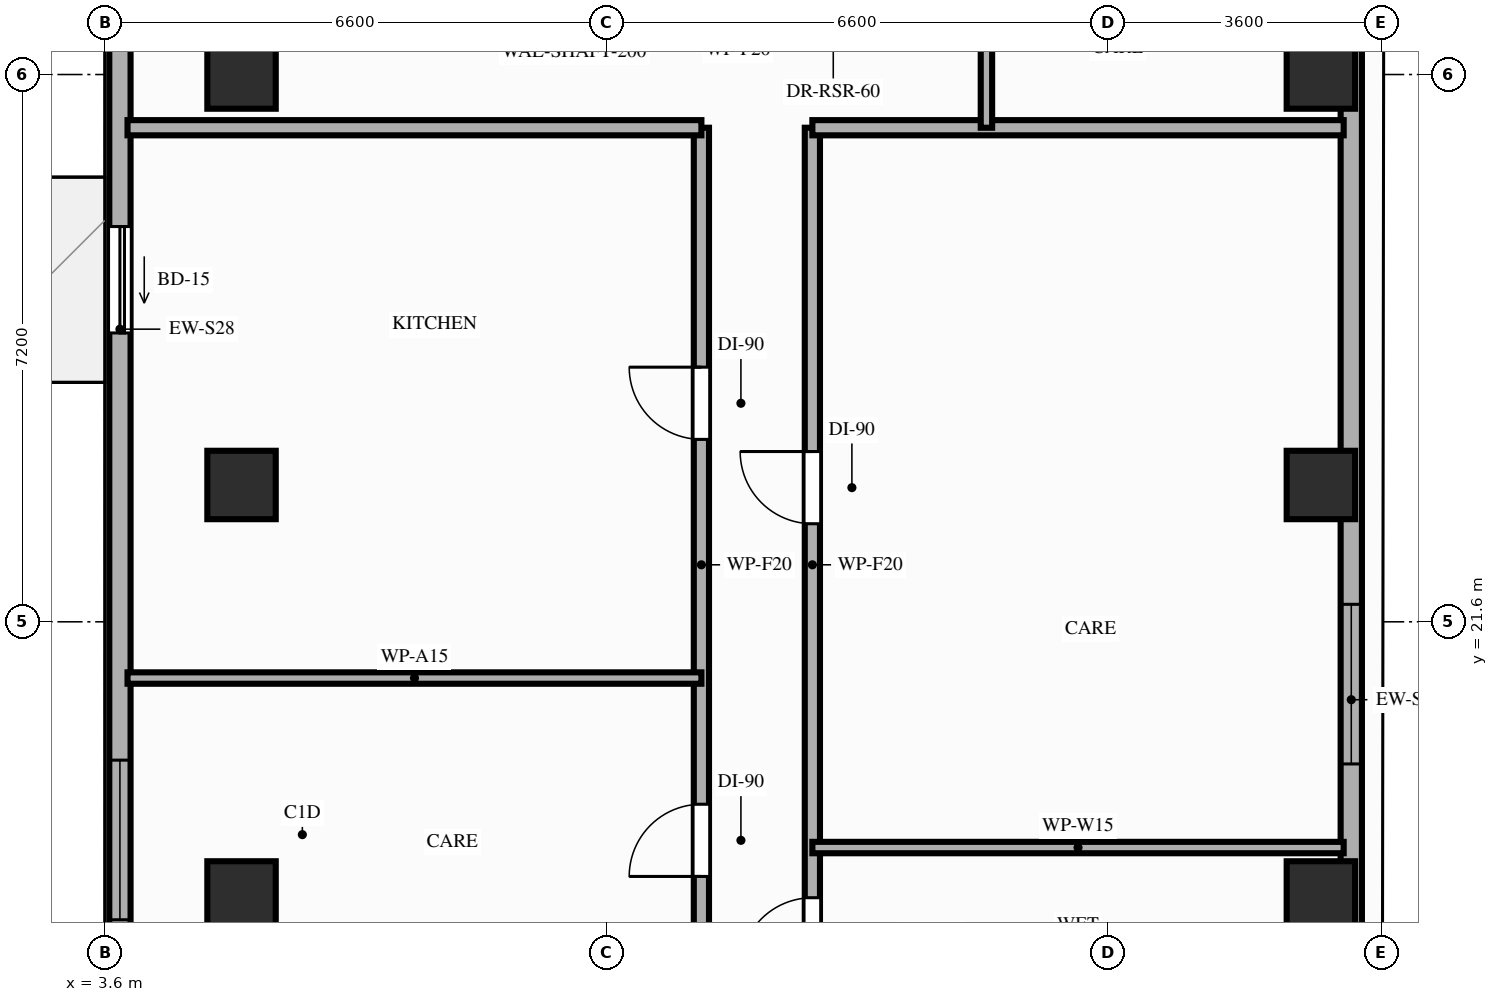
"""IFC4 building model, lengths in metres.
Left out: names, types, materials, properties, quantities, classifications, styles, units other than length and angle.
Written with IfcOpenShell. Run it as: python <this file> out.ifc"""

import sys

from ifc_helpers import new_model, si_unit, direction, frame, frame_2d, origin, origin_2d, place, context, subcontext, project, spatial, rectangle, extrude, element, fill, save


model = new_model("IFC4")
c1 = context("Model", 3, precision=1e-05, world=origin(), true_north=direction((0.0, 1.0)))
c2 = subcontext(c1, "Body", "Model", "MODEL_VIEW")
j1 = project(units=[si_unit("LENGTHUNIT", "METRE"), si_unit("PLANEANGLEUNIT", "RADIAN")], contexts=[c1])
p1 = place(None, origin())
s1 = spatial("IfcSite", under=j1, at=p1, CompositionType="ELEMENT")
p2 = place(p1, origin())
s2 = spatial("IfcBuilding", under=s1, at=p2, CompositionType="ELEMENT")
p3 = place(p2, frame((0.0, 0.0, 211.2)))
s3 = spatial("IfcBuildingStorey", under=s2, at=p3, CompositionType="ELEMENT", Elevation=211.2)
for number, where, z_axis, x_axis in (
    (1, (5.4, 18.0, 0.0), (0.0, 0.0, 1.0), (1.0, 0.0, 0.0)),
    (2, (19.6, 18.0, 0.0), (0.0, 0.0, 1.0), (1.0, 0.0, 0.0)),
    (3, (5.4, 23.4, 0.0), (0.0, 0.0, 1.0), (1.0, 0.0, 0.0)),
    (4, (19.6, 23.4, 0.0), (0.0, 0.0, 1.0), (1.0, 0.0, 0.0)),
    (5, (5.4, 28.8, 0.0), (0.0, 0.0, 1.0), (1.0, 0.0, 0.0)),
    (6, (19.6, 28.8, 0.0), (0.0, 0.0, 1.0), (1.0, 0.0, 0.0)),
):
    element("IfcColumn", number, at=place(p3, frame(where, z_axis=z_axis, x_axis=x_axis)), inside=s3, PredefinedType="COLUMN", context=c2, shape_type="SweptSolid", body=[
        extrude(rectangle(XDim=0.9, YDim=0.9, at=origin_2d()), origin(), (0.0, 0.0, 1.0), 3.2),
    ])
p4 = place(p3, frame((3.8, 42.1, 0.0), z_axis=(0.0, 0.0, 1.0), x_axis=(0.0, -1.0, 0.0)))
e7 = element("IfcWall", 7, at=p4, inside=s3, PredefinedType="STANDARD", context=c2, shape_type="SweptSolid", body=[
    extrude(rectangle(XDim=33.3, YDim=0.28, at=frame_2d((16.65, 0.0))), origin(), (0.0, 0.0, 1.0), 2.96),
])
p5 = place(p4, frame((26.1, 0.0, 0.0)))
e8 = element("IfcOpeningElement", 8, at=p5, cuts=e7, PredefinedType="OPENING", context=c2, shape_type="SweptSolid", body=[
    extrude(rectangle(XDim=1.4, YDim=2.1, at=frame_2d((0.7, 1.05))), frame((0.0, 0.15, 0.0), z_axis=(0.0, -1.0, 0.0), x_axis=(1.0, 0.0, 0.0)), (0.0, 0.0, 1.0), 0.3),
])
p6 = place(p4, frame((15.3, 0.0, 0.0)))
e9 = element("IfcOpeningElement", 9, at=p6, cuts=e7, PredefinedType="OPENING", context=c2, shape_type="SweptSolid", body=[
    extrude(rectangle(XDim=1.4, YDim=2.1, at=frame_2d((0.7, 1.05))), frame((0.0, 0.15, 0.0), z_axis=(0.0, -1.0, 0.0), x_axis=(1.0, 0.0, 0.0)), (0.0, 0.0, 1.0), 0.3),
])
p7 = place(p4, frame((22.32, 0.0, 0.85)))
e10 = element("IfcOpeningElement", 10, at=p7, cuts=e7, PredefinedType="OPENING", context=c2, shape_type="SweptSolid", body=[
    extrude(rectangle(XDim=2.1, YDim=1.8, at=frame_2d((1.05, 0.9))), frame((0.0, 0.15, 0.0), z_axis=(0.0, -1.0, 0.0), x_axis=(1.0, 0.0, 0.0)), (0.0, 0.0, 1.0), 0.3),
])
p8 = place(p4, frame((30.65, 0.0, 0.85)))
e11 = element("IfcOpeningElement", 11, at=p8, cuts=e7, PredefinedType="OPENING", context=c2, shape_type="SweptSolid", body=[
    extrude(rectangle(XDim=2.1, YDim=1.8, at=frame_2d((1.05, 0.9))), frame((0.0, 0.15, 0.0), z_axis=(0.0, -1.0, 0.0), x_axis=(1.0, 0.0, 0.0)), (0.0, 0.0, 1.0), 0.3),
])
p9 = place(p4, frame((9.75, 0.0, 0.85)))
e12 = element("IfcOpeningElement", 12, at=p9, cuts=e7, PredefinedType="OPENING", context=c2, shape_type="SweptSolid", body=[
    extrude(rectangle(XDim=2.1, YDim=1.8, at=frame_2d((1.05, 0.9))), frame((0.0, 0.15, 0.0), z_axis=(0.0, -1.0, 0.0), x_axis=(1.0, 0.0, 0.0)), (0.0, 0.0, 1.0), 0.3),
])
p10 = place(p4, frame((3.65, 0.0, 0.85)))
e13 = element("IfcOpeningElement", 13, at=p10, cuts=e7, PredefinedType="OPENING", context=c2, shape_type="SweptSolid", body=[
    extrude(rectangle(XDim=2.1, YDim=1.8, at=frame_2d((1.05, 0.9))), frame((0.0, 0.15, 0.0), z_axis=(0.0, -1.0, 0.0), x_axis=(1.0, 0.0, 0.0)), (0.0, 0.0, 1.0), 0.3),
])
p11 = place(p3, frame((20.0, 8.8, 0.0), z_axis=(0.0, 0.0, 1.0), x_axis=(0.0, 1.0, 0.0)))
e14 = element("IfcWall", 14, at=p11, inside=s3, PredefinedType="STANDARD", context=c2, shape_type="SweptSolid", body=[
    extrude(rectangle(XDim=23.55, YDim=0.28, at=frame_2d((11.775, 0.0))), origin(), (0.0, 0.0, 1.0), 2.45),
])
p12 = place(p11, frame((20.86, 0.0, 0.85)))
e15 = element("IfcOpeningElement", 15, at=p12, cuts=e14, PredefinedType="OPENING", context=c2, shape_type="SweptSolid", body=[
    extrude(rectangle(XDim=1.1, YDim=1.35, at=frame_2d((0.55, 0.675))), frame((0.0, 0.15, 0.0), z_axis=(0.0, -1.0, 0.0), x_axis=(1.0, 0.0, 0.0)), (0.0, 0.0, 1.0), 0.3),
])
p13 = place(p11, frame((5.12, 0.0, 0.85)))
e16 = element("IfcOpeningElement", 16, at=p13, cuts=e14, PredefinedType="OPENING", context=c2, shape_type="SweptSolid", body=[
    extrude(rectangle(XDim=2.1, YDim=1.35, at=frame_2d((1.05, 0.675))), frame((0.0, 0.15, 0.0), z_axis=(0.0, -1.0, 0.0), x_axis=(1.0, 0.0, 0.0)), (0.0, 0.0, 1.0), 0.3),
])
p14 = place(p11, frame((10.93, 0.0, 0.85)))
e17 = element("IfcOpeningElement", 17, at=p14, cuts=e14, PredefinedType="OPENING", context=c2, shape_type="SweptSolid", body=[
    extrude(rectangle(XDim=2.1, YDim=1.35, at=frame_2d((1.05, 0.675))), frame((0.0, 0.15, 0.0), z_axis=(0.0, -1.0, 0.0), x_axis=(1.0, 0.0, 0.0)), (0.0, 0.0, 1.0), 0.3),
])
p15 = place(p3, frame((11.45, 16.6, 0.0), z_axis=(0.0, 0.0, 1.0), x_axis=(0.0, 1.0, 0.0)))
e18 = element("IfcWall", 18, at=p15, inside=s3, PredefinedType="PARTITIONING", context=c2, shape_type="SweptSolid", body=[
    extrude(rectangle(XDim=11.5, YDim=0.2, at=frame_2d((5.75, 0.0))), origin(), (0.0, 0.0, 1.0), 2.45),
])
p16 = place(p15, frame((1.65, 0.0, 0.0)))
e19 = element("IfcOpeningElement", 19, at=p16, cuts=e18, PredefinedType="OPENING", context=c2, shape_type="SweptSolid", body=[
    extrude(rectangle(XDim=0.95, YDim=2.15, at=frame_2d((0.475, 1.075))), frame((0.0, 0.11, 0.0), z_axis=(0.0, -1.0, 0.0), x_axis=(1.0, 0.0, 0.0)), (0.0, 0.0, 1.0), 0.22),
])
p17 = place(p15, frame((7.4, 0.0, 0.0)))
e20 = element("IfcOpeningElement", 20, at=p17, cuts=e18, PredefinedType="OPENING", context=c2, shape_type="SweptSolid", body=[
    extrude(rectangle(XDim=0.95, YDim=2.15, at=frame_2d((0.475, 1.075))), frame((0.0, 0.11, 0.0), z_axis=(0.0, -1.0, 0.0), x_axis=(1.0, 0.0, 0.0)), (0.0, 0.0, 1.0), 0.22),
])
p18 = place(p3, frame((12.91, 16.6, 0.0), z_axis=(0.0, 0.0, 1.0), x_axis=(0.0, 1.0, 0.0)))
e21 = element("IfcWall", 21, at=p18, inside=s3, PredefinedType="PARTITIONING", context=c2, shape_type="SweptSolid", body=[
    extrude(rectangle(XDim=11.5, YDim=0.2, at=frame_2d((5.75, 0.0))), origin(), (0.0, 0.0, 1.0), 2.45),
])
p19 = place(p18, frame((0.42, 0.0, 0.0)))
e22 = element("IfcOpeningElement", 22, at=p19, cuts=e21, PredefinedType="OPENING", context=c2, shape_type="SweptSolid", body=[
    extrude(rectangle(XDim=0.95, YDim=2.1, at=frame_2d((0.475, 1.05))), frame((0.0, 0.11, 0.0), z_axis=(0.0, -1.0, 0.0), x_axis=(1.0, 0.0, 0.0)), (0.0, 0.0, 1.0), 0.22),
])
p20 = place(p18, frame((6.29, 0.0, 0.0)))
e23 = element("IfcOpeningElement", 23, at=p20, cuts=e21, PredefinedType="OPENING", context=c2, shape_type="SweptSolid", body=[
    extrude(rectangle(XDim=0.95, YDim=2.15, at=frame_2d((0.475, 1.075))), frame((0.0, 0.11, 0.0), z_axis=(0.0, -1.0, 0.0), x_axis=(1.0, 0.0, 0.0)), (0.0, 0.0, 1.0), 0.22),
])
p21 = place(p3, frame((3.9, 28.1, 0.0), z_axis=(0.0, 0.0, 1.0), x_axis=(1.0, 0.0, 0.0)))
e24 = element("IfcWall", 24, at=p21, inside=s3, PredefinedType="PARTITIONING", context=c2, shape_type="SweptSolid", body=[
    extrude(rectangle(XDim=7.55, YDim=0.2, at=frame_2d((3.775, 0.0))), origin(), (0.0, 0.0, 1.0), 2.45),
])
p22 = place(p3, frame((12.91, 28.1, 0.0), z_axis=(0.0, 0.0, 1.0), x_axis=(1.0, 0.0, 0.0)))
e25 = element("IfcWall", 25, at=p22, inside=s3, PredefinedType="PARTITIONING", context=c2, shape_type="SweptSolid", body=[
    extrude(rectangle(XDim=6.99, YDim=0.2, at=frame_2d((3.495, 0.0))), origin(), (0.0, 0.0, 1.0), 2.45),
])
p23 = place(p3, frame((15.2, 28.1, 0.0), z_axis=(0.0, 0.0, 1.0), x_axis=(0.0, 1.0, 0.0)))
e26 = element("IfcWall", 26, at=p23, inside=s3, PredefinedType="PARTITIONING", context=c2, shape_type="SweptSolid", body=[
    extrude(rectangle(XDim=3.05, YDim=0.15, at=frame_2d((1.525, 0.0))), origin(), (0.0, 0.0, 1.0), 2.45),
])
p24 = place(p3, frame((3.9, 20.86, 0.0), z_axis=(0.0, 0.0, 1.0), x_axis=(1.0, 0.0, 0.0)))
e27 = element("IfcWall", 27, at=p24, inside=s3, PredefinedType="PARTITIONING", context=c2, shape_type="SweptSolid", body=[
    extrude(rectangle(XDim=7.55, YDim=0.15, at=frame_2d((3.775, 0.0))), origin(), (0.0, 0.0, 1.0), 2.45),
])
p25 = place(p3, frame((12.91, 18.63, 0.0), z_axis=(0.0, 0.0, 1.0), x_axis=(1.0, 0.0, 0.0)))
e28 = element("IfcWall", 28, at=p25, inside=s3, PredefinedType="PARTITIONING", context=c2, shape_type="SweptSolid", body=[
    extrude(rectangle(XDim=6.99, YDim=0.15, at=frame_2d((3.495, 0.0))), origin(), (0.0, 0.0, 1.0), 2.45),
])
p26 = place(p6, origin())
e29 = element("IfcDoor", 29, at=p26, inside=s3, OperationType="SLIDING_TO_RIGHT", PredefinedType="DOOR", context=c2, shape_type="SweptSolid", body=[
    extrude(rectangle(XDim=1.4, YDim=2.1, at=frame_2d((0.7, 1.05))), frame((0.0, 0.025, 0.0), z_axis=(0.0, -1.0, 0.0), x_axis=(1.0, 0.0, 0.0)), (0.0, 0.0, 1.0), 0.05),
])
fill(e9, e29)
p27 = place(p7, origin())
e30 = element("IfcWindow", 30, at=p27, inside=s3, PartitioningType="SINGLE_PANEL", PredefinedType="WINDOW", context=c2, shape_type="SweptSolid", body=[
    extrude(rectangle(XDim=2.1, YDim=1.8, at=frame_2d((1.05, 0.9))), frame((0.0, 0.03, 0.0), z_axis=(0.0, -1.0, 0.0), x_axis=(1.0, 0.0, 0.0)), (0.0, 0.0, 1.0), 0.06),
])
fill(e10, e30)
p28 = place(p14, origin())
e31 = element("IfcWindow", 31, at=p28, inside=s3, PartitioningType="SINGLE_PANEL", PredefinedType="WINDOW", context=c2, shape_type="SweptSolid", body=[
    extrude(rectangle(XDim=2.1, YDim=1.35, at=frame_2d((1.05, 0.675))), frame((0.0, 0.03, 0.0), z_axis=(0.0, -1.0, 0.0), x_axis=(1.0, 0.0, 0.0)), (0.0, 0.0, 1.0), 0.06),
])
fill(e17, e31)
p29 = place(p16, origin())
e32 = element("IfcDoor", 32, at=p29, inside=s3, OperationType="SINGLE_SWING_LEFT", PredefinedType="DOOR", context=c2, shape_type="SweptSolid", body=[
    extrude(rectangle(XDim=0.95, YDim=2.15, at=frame_2d((0.475, 1.075))), frame((0.0, 0.025, 0.0), z_axis=(0.0, -1.0, 0.0), x_axis=(1.0, 0.0, 0.0)), (0.0, 0.0, 1.0), 0.05),
])
fill(e19, e32)
p30 = place(p17, origin())
e33 = element("IfcDoor", 33, at=p30, inside=s3, OperationType="SINGLE_SWING_RIGHT", PredefinedType="DOOR", context=c2, shape_type="SweptSolid", body=[
    extrude(rectangle(XDim=0.95, YDim=2.15, at=frame_2d((0.475, 1.075))), frame((0.0, 0.025, 0.0), z_axis=(0.0, -1.0, 0.0), x_axis=(1.0, 0.0, 0.0)), (0.0, 0.0, 1.0), 0.05),
])
fill(e20, e33)
p31 = place(p19, origin())
e34 = element("IfcDoor", 34, at=p31, inside=s3, OperationType="SINGLE_SWING_LEFT", PredefinedType="DOOR", context=c2, shape_type="SweptSolid", body=[
    extrude(rectangle(XDim=0.95, YDim=2.1, at=frame_2d((0.475, 1.05))), frame((0.0, 0.025, 0.0), z_axis=(0.0, -1.0, 0.0), x_axis=(1.0, 0.0, 0.0)), (0.0, 0.0, 1.0), 0.05),
])
fill(e22, e34)
p32 = place(p20, origin())
e35 = element("IfcDoor", 35, at=p32, inside=s3, OperationType="SINGLE_SWING_RIGHT", PredefinedType="DOOR", context=c2, shape_type="SweptSolid", body=[
    extrude(rectangle(XDim=0.95, YDim=2.15, at=frame_2d((0.475, 1.075))), frame((0.0, 0.025, 0.0), z_axis=(0.0, -1.0, 0.0), x_axis=(1.0, 0.0, 0.0)), (0.0, 0.0, 1.0), 0.05),
])
fill(e23, e35)
save(model, sys.argv[1])
